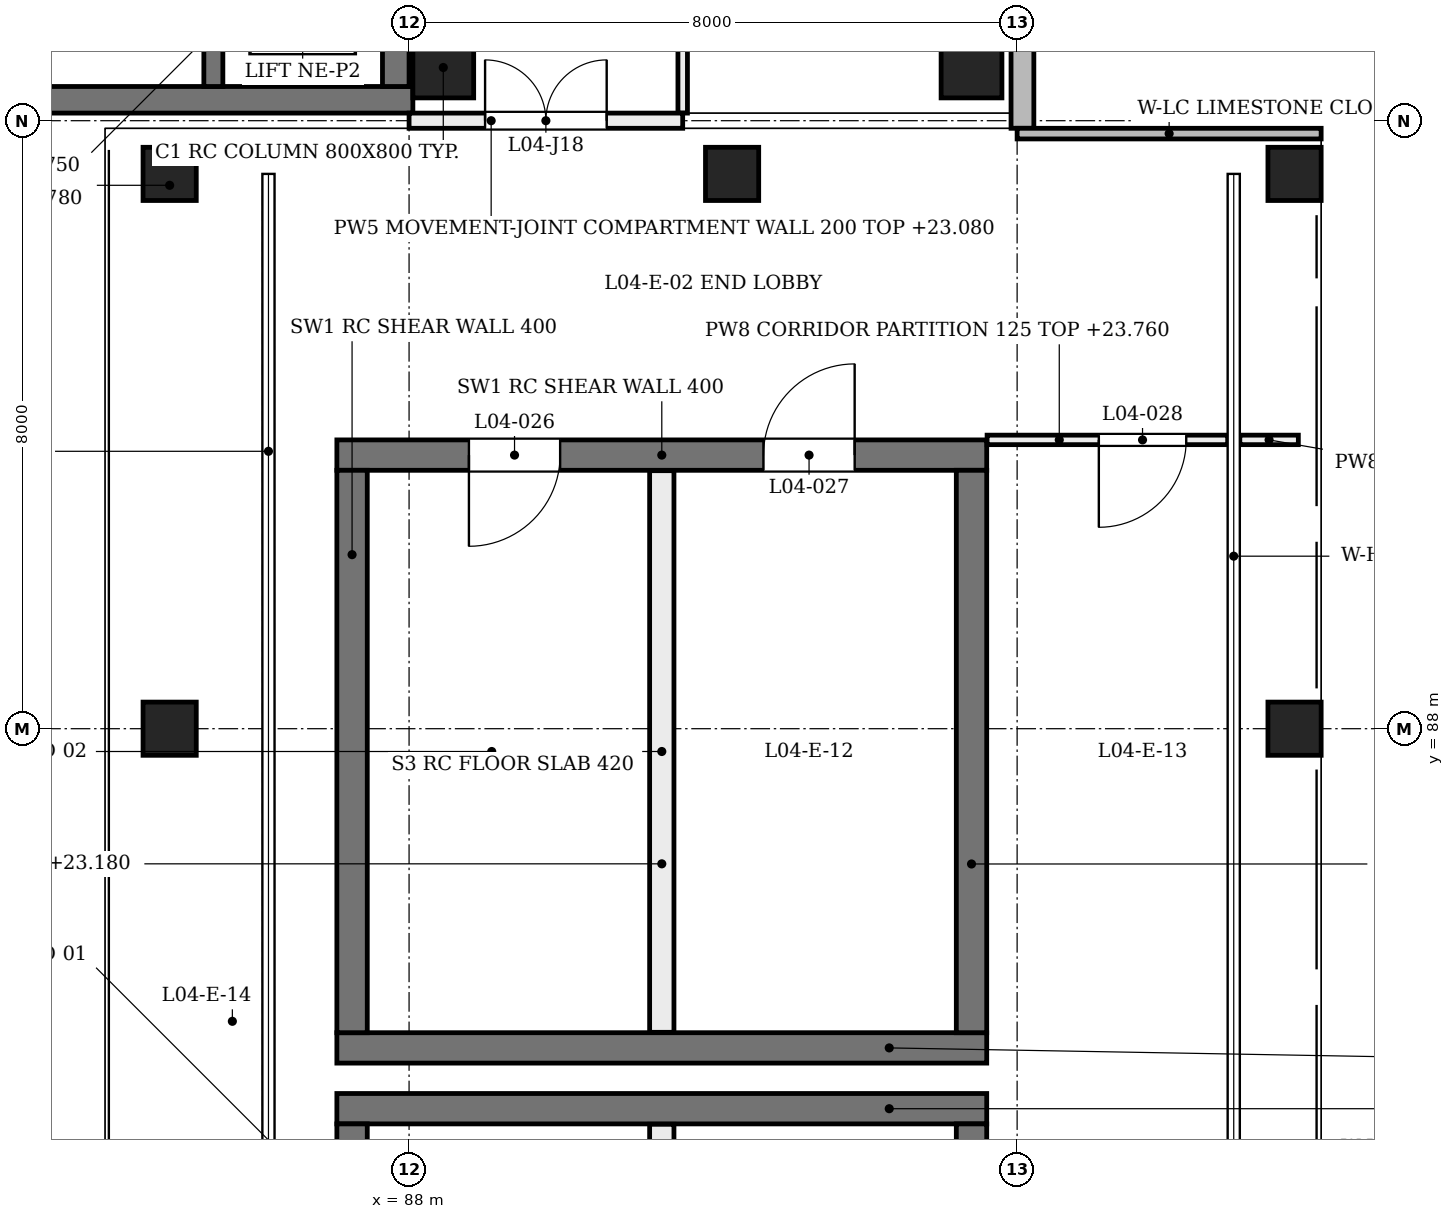
"""IFC4 building model, lengths in metres.
Left out: names, types, materials, properties, quantities, classifications, styles, units other than length and angle.
Written with IfcOpenShell. Run it as: python <this file> out.ifc"""

import sys

from ifc_helpers import new_model, si_unit, direction, frame, frame_2d, origin, origin_2d, place, context, subcontext, project, spatial, rectangle, extrude, element, fill, save


model = new_model("IFC4")
c1 = context("Model", 3, precision=1e-05, world=origin(), true_north=direction((0.0, 1.0)))
c2 = subcontext(c1, "Body", "Model", "MODEL_VIEW")
j1 = project(units=[si_unit("LENGTHUNIT", "METRE"), si_unit("PLANEANGLEUNIT", "RADIAN")], contexts=[c1])
p1 = place(None, origin())
s1 = spatial("IfcSite", under=j1, at=p1, CompositionType="ELEMENT")
p2 = place(p1, origin())
s2 = spatial("IfcBuilding", under=s1, at=p2, CompositionType="ELEMENT")
p3 = place(p2, frame((0.0, 0.0, 19.2)))
s3 = spatial("IfcBuildingStorey", under=s2, at=p3, CompositionType="ELEMENT", Elevation=19.2)
p4 = place(p3, frame((87.05, 83.0, 0.0), z_axis=(0.0, 0.0, 1.0), x_axis=(1.0, 0.0, 0.0)))
e1 = element("IfcWall", 1, at=p4, inside=s3, PredefinedType="SHEAR", context=c2, shape_type="SweptSolid", body=[
    extrude(rectangle(XDim=8.55, YDim=0.4, at=frame_2d((4.275, 0.0))), origin(), (0.0, 0.0, 1.0), 4.58),
])
p5 = place(p3, frame((87.25, 75.8, 0.0), z_axis=(0.0, 0.0, 1.0), x_axis=(0.0, 1.0, 0.0)))
e2 = element("IfcWall", 2, at=p5, inside=s3, PredefinedType="SHEAR", context=c2, shape_type="SweptSolid", body=[
    extrude(rectangle(XDim=7.0, YDim=0.4, at=frame_2d((3.5, 0.0))), origin(), (0.0, 0.0, 1.0), 4.58),
])
p6 = place(p5, frame((3.0, 0.0, 0.0)))
e3 = element("IfcOpeningElement", 3, at=p6, cuts=e2, PredefinedType="OPENING", context=c2, shape_type="SweptSolid", body=[
    extrude(rectangle(XDim=1.2, YDim=2.4, at=frame_2d((0.6, 1.2))), frame((0.0, 0.21, 0.0), z_axis=(0.0, -1.0, 0.0), x_axis=(1.0, 0.0, 0.0)), (0.0, 0.0, 1.0), 0.42),
])
p7 = place(p3, frame((95.4, 75.8, 0.0), z_axis=(0.0, 0.0, 1.0), x_axis=(0.0, 1.0, 0.0)))
e4 = element("IfcWall", 4, at=p7, inside=s3, PredefinedType="SHEAR", context=c2, shape_type="SweptSolid", body=[
    extrude(rectangle(XDim=7.0, YDim=0.4, at=frame_2d((3.5, 0.0))), origin(), (0.0, 0.0, 1.0), 4.58),
])
p8 = place(p7, frame((3.027, 0.0, 0.0)))
e5 = element("IfcOpeningElement", 5, at=p8, cuts=e4, PredefinedType="OPENING", context=c2, shape_type="SweptSolid", body=[
    extrude(rectangle(XDim=1.15, YDim=2.1, at=frame_2d((0.575, 1.05))), frame((0.0, 0.21, 0.0), z_axis=(0.0, -1.0, 0.0), x_axis=(1.0, 0.0, 0.0)), (0.0, 0.0, 1.0), 0.42),
])
p9 = place(p3, frame((87.05, 83.8, 0.0), z_axis=(0.0, 0.0, 1.0), x_axis=(1.0, 0.0, 0.0)))
e6 = element("IfcWall", 6, at=p9, inside=s3, PredefinedType="SHEAR", context=c2, shape_type="SweptSolid", body=[
    extrude(rectangle(XDim=8.55, YDim=0.4, at=frame_2d((4.275, 0.0))), origin(), (0.0, 0.0, 1.0), 4.58),
])
p10 = place(p3, frame((87.05, 91.6, 0.0), z_axis=(0.0, 0.0, 1.0), x_axis=(1.0, 0.0, 0.0)))
e7 = element("IfcWall", 7, at=p10, inside=s3, PredefinedType="SHEAR", context=c2, shape_type="SweptSolid", body=[
    extrude(rectangle(XDim=8.55, YDim=0.4, at=frame_2d((4.275, 0.0))), origin(), (0.0, 0.0, 1.0), 4.58),
])
p11 = place(p10, frame((1.738, 0.0, 0.0)))
e8 = element("IfcOpeningElement", 8, at=p11, cuts=e7, PredefinedType="OPENING", context=c2, shape_type="SweptSolid", body=[
    extrude(rectangle(XDim=1.2, YDim=2.4, at=frame_2d((0.6, 1.2))), frame((0.0, 0.21, 0.0), z_axis=(0.0, -1.0, 0.0), x_axis=(1.0, 0.0, 0.0)), (0.0, 0.0, 1.0), 0.42),
])
p12 = place(p10, frame((5.613, 0.0, 0.0)))
e9 = element("IfcOpeningElement", 9, at=p12, cuts=e7, PredefinedType="OPENING", context=c2, shape_type="SweptSolid", body=[
    extrude(rectangle(XDim=1.2, YDim=2.4, at=frame_2d((0.6, 1.2))), frame((0.0, 0.21, 0.0), z_axis=(0.0, -1.0, 0.0), x_axis=(1.0, 0.0, 0.0)), (0.0, 0.0, 1.0), 0.42),
])
for number, where, z_axis, x_axis in (
    (10, (87.25, 84.0, 0.0), (0.0, 0.0, 1.0), (0.0, 1.0, 0.0)),
    (11, (95.4, 84.0, 0.0), (0.0, 0.0, 1.0), (0.0, 1.0, 0.0)),
):
    element("IfcWall", number, at=place(p3, frame(where, z_axis=z_axis, x_axis=x_axis)), inside=s3, PredefinedType="SHEAR", context=c2, shape_type="SweptSolid", body=[
        extrude(rectangle(XDim=7.4, YDim=0.4, at=frame_2d((3.7, 0.0))), origin(), (0.0, 0.0, 1.0), 4.58),
    ])
p13 = place(p3, frame((80.1, 96.275, 0.0), z_axis=(0.0, 0.0, 1.0), x_axis=(1.0, 0.0, 0.0)))
e12 = element("IfcWall", 12, at=p13, inside=s3, PredefinedType="SHEAR", context=c2, shape_type="SweptSolid", body=[
    extrude(rectangle(XDim=7.95, YDim=0.35, at=frame_2d((3.975, 0.0))), origin(), (0.0, 0.0, 1.0), 4.58),
])
p14 = place(p3, frame((87.825, 96.45, 0.0), z_axis=(0.0, 0.0, 1.0), x_axis=(0.0, 1.0, 0.0)))
e13 = element("IfcWall", 13, at=p14, inside=s3, PredefinedType="SHEAR", context=c2, shape_type="SweptSolid", body=[
    extrude(rectangle(XDim=15.2, YDim=0.35, at=frame_2d((7.6, 0.0))), origin(), (0.0, 0.0, 1.0), 4.58),
])
p15 = place(p14, frame((13.25, 0.0, 0.0)))
e14 = element("IfcOpeningElement", 14, at=p15, cuts=e13, PredefinedType="OPENING", context=c2, shape_type="SweptSolid", body=[
    extrude(rectangle(XDim=1.0, YDim=2.1, at=frame_2d((0.5, 1.05))), frame((0.0, 0.185, 0.0), z_axis=(0.0, -1.0, 0.0), x_axis=(1.0, 0.0, 0.0)), (0.0, 0.0, 1.0), 0.37),
])
p16 = place(p14, frame((3.2, 0.0, 0.0)))
e15 = element("IfcOpeningElement", 15, at=p16, cuts=e13, PredefinedType="OPENING", context=c2, shape_type="SweptSolid", body=[
    extrude(rectangle(XDim=1.4, YDim=2.1, at=frame_2d((0.7, 1.05))), frame((0.0, 0.185, 0.0), z_axis=(0.0, -1.0, 0.0), x_axis=(1.0, 0.0, 0.0)), (0.0, 0.0, 1.0), 0.37),
])
for number, where, z_axis, x_axis in (
    (16, (88.45, 96.7, 0.0), (0.0, 0.0, 1.0), (1.0, 0.0, 0.0)),
    (17, (95.4, 96.7, 0.0), (0.0, 0.0, 1.0), (1.0, 0.0, 0.0)),
):
    element("IfcColumn", number, at=place(p3, frame(where, z_axis=z_axis, x_axis=x_axis)), inside=s3, PredefinedType="COLUMN", context=c2, shape_type="SweptSolid", body=[
        extrude(rectangle(XDim=0.8, YDim=0.8, at=origin_2d()), origin(), (0.0, 0.0, 1.0), 4.8),
    ])
for number, where, z_axis, x_axis in (
    (18, (84.6, 88.0, 0.0), (0.204, 0.0, 0.979), (0.0, 1.0, 0.0)),
    (19, (84.6, 95.3, 0.0), (0.204, 0.0, 0.979), (0.0, 1.0, 0.0)),
    (20, (92.0, 95.3, 0.0), (0.204, 0.0, 0.979), (0.0, 1.0, 0.0)),
    (21, (99.4, 88.0, 0.0), (0.204, 0.0, 0.979), (0.0, 1.0, 0.0)),
    (22, (99.4, 95.3, 0.0), (0.204, 0.0, 0.979), (0.0, 1.0, 0.0)),
):
    element("IfcColumn", number, at=place(p3, frame(where, z_axis=z_axis, x_axis=x_axis)), inside=s3, PredefinedType="COLUMN", context=c2, shape_type="SweptSolid", body=[
        extrude(rectangle(XDim=0.7, YDim=0.7, at=origin_2d()), origin(), (0.0, 0.0, 1.0), 4.678),
    ])
p17 = place(p3, frame((98.85, 80.2, 4.1), z_axis=(0.0, 0.0, 1.0), x_axis=(0.0, 1.0, 0.0)))
e23 = element("IfcWall", 23, at=p17, inside=s3, PredefinedType="SOLIDWALL", context=c2, shape_type="SweptSolid", body=[
    extrude(rectangle(XDim=7.6, YDim=0.15, at=frame_2d((3.8, 0.0))), origin(), (0.0, 0.0, 1.0), 0.48),
])
p18 = place(p3, frame((98.85, 88.2, 4.1), z_axis=(0.0, 0.0, 1.0), x_axis=(0.0, 1.0, 0.0)))
e24 = element("IfcWall", 24, at=p18, inside=s3, PredefinedType="SOLIDWALL", context=c2, shape_type="SweptSolid", body=[
    extrude(rectangle(XDim=6.9, YDim=0.15, at=frame_2d((3.45, 0.0))), origin(), (0.0, 0.0, 1.0), 0.48),
])
p19 = place(p3, frame((86.15, 80.2, 4.1), z_axis=(0.0, 0.0, 1.0), x_axis=(0.0, 1.0, 0.0)))
e25 = element("IfcWall", 25, at=p19, inside=s3, PredefinedType="SOLIDWALL", context=c2, shape_type="SweptSolid", body=[
    extrude(rectangle(XDim=7.6, YDim=0.15, at=frame_2d((3.8, 0.0))), origin(), (0.0, 0.0, 1.0), 0.48),
])
p20 = place(p3, frame((86.15, 88.2, 4.1), z_axis=(0.0, 0.0, 1.0), x_axis=(0.0, 1.0, 0.0)))
e26 = element("IfcWall", 26, at=p20, inside=s3, PredefinedType="SOLIDWALL", context=c2, shape_type="SweptSolid", body=[
    extrude(rectangle(XDim=6.9, YDim=0.15, at=frame_2d((3.45, 0.0))), origin(), (0.0, 0.0, 1.0), 0.48),
])
p21 = place(p3, frame((96.07, 95.9, 0.0), z_axis=(0.0, 0.0, 1.0), x_axis=(0.0, 1.0, 0.0)))
e27 = element("IfcWall", 27, at=p21, inside=s3, PredefinedType="SOLIDWALL", context=c2, shape_type="SweptSolid", body=[
    extrude(rectangle(XDim=16.4, YDim=0.3, at=frame_2d((8.2, 0.0))), origin(), (0.0, 0.0, 1.0), 3.9),
])
p22 = place(p21, frame((1.1, 0.0, 0.75)))
e28 = element("IfcOpeningElement", 28, at=p22, cuts=e27, PredefinedType="OPENING", context=c2, shape_type="SweptSolid", body=[
    extrude(rectangle(XDim=0.9, YDim=3.1, at=frame_2d((0.45, 1.55))), frame((0.0, 0.16, 0.0), z_axis=(0.0, -1.0, 0.0), x_axis=(1.0, 0.0, 0.0)), (0.0, 0.0, 1.0), 0.32),
])
p23 = place(p21, frame((3.8, 0.0, 0.75)))
e29 = element("IfcOpeningElement", 29, at=p23, cuts=e27, PredefinedType="OPENING", context=c2, shape_type="SweptSolid", body=[
    extrude(rectangle(XDim=0.9, YDim=3.1, at=frame_2d((0.45, 1.55))), frame((0.0, 0.16, 0.0), z_axis=(0.0, -1.0, 0.0), x_axis=(1.0, 0.0, 0.0)), (0.0, 0.0, 1.0), 0.32),
])
p24 = place(p21, frame((6.5, 0.0, 0.75)))
e30 = element("IfcOpeningElement", 30, at=p24, cuts=e27, PredefinedType="OPENING", context=c2, shape_type="SweptSolid", body=[
    extrude(rectangle(XDim=0.9, YDim=3.1, at=frame_2d((0.45, 1.55))), frame((0.0, 0.16, 0.0), z_axis=(0.0, -1.0, 0.0), x_axis=(1.0, 0.0, 0.0)), (0.0, 0.0, 1.0), 0.32),
])
p25 = place(p21, frame((9.2, 0.0, 0.75)))
e31 = element("IfcOpeningElement", 31, at=p25, cuts=e27, PredefinedType="OPENING", context=c2, shape_type="SweptSolid", body=[
    extrude(rectangle(XDim=0.9, YDim=3.1, at=frame_2d((0.45, 1.55))), frame((0.0, 0.16, 0.0), z_axis=(0.0, -1.0, 0.0), x_axis=(1.0, 0.0, 0.0)), (0.0, 0.0, 1.0), 0.32),
])
p26 = place(p21, frame((11.9, 0.0, 0.75)))
e32 = element("IfcOpeningElement", 32, at=p26, cuts=e27, PredefinedType="OPENING", context=c2, shape_type="SweptSolid", body=[
    extrude(rectangle(XDim=0.9, YDim=3.1, at=frame_2d((0.45, 1.55))), frame((0.0, 0.16, 0.0), z_axis=(0.0, -1.0, 0.0), x_axis=(1.0, 0.0, 0.0)), (0.0, 0.0, 1.0), 0.32),
])
p27 = place(p21, frame((14.6, 0.0, 0.75)))
e33 = element("IfcOpeningElement", 33, at=p27, cuts=e27, PredefinedType="OPENING", context=c2, shape_type="SweptSolid", body=[
    extrude(rectangle(XDim=0.9, YDim=3.1, at=frame_2d((0.45, 1.55))), frame((0.0, 0.16, 0.0), z_axis=(0.0, -1.0, 0.0), x_axis=(1.0, 0.0, 0.0)), (0.0, 0.0, 1.0), 0.32),
])
p28 = place(p3, frame((96.0, 95.83, 0.0), z_axis=(0.0, 0.0, 1.0), x_axis=(1.0, 0.0, 0.0)))
e34 = element("IfcWall", 34, at=p28, inside=s3, PredefinedType="SOLIDWALL", context=c2, shape_type="SweptSolid", body=[
    extrude(rectangle(XDim=4.0, YDim=0.14, at=frame_2d((2.0, 0.0))), origin(), (0.0, 0.0, 1.0), 3.9),
])
p29 = place(p3, frame((85.425, 98.9, 0.0), z_axis=(0.0, 0.0, 1.0), x_axis=(0.0, -1.0, 0.0)))
e35 = element("IfcWall", 35, at=p29, inside=s3, PredefinedType="SOLIDWALL", context=c2, shape_type="SweptSolid", body=[
    extrude(rectangle(XDim=2.45, YDim=0.25, at=frame_2d((1.225, 0.0))), origin(), (0.0, 0.0, 1.0), 4.55),
])
p30 = place(p3, frame((95.605, 91.8, 0.0), z_axis=(0.0, 0.0, 1.0), x_axis=(1.0, 0.0, 0.0)))
e36 = element("IfcWall", 36, at=p30, inside=s3, PredefinedType="PARTITIONING", context=c2, shape_type="SweptSolid", body=[
    extrude(rectangle(XDim=3.165, YDim=0.125, at=frame_2d((1.583, 0.0))), origin(), (0.0, 0.0, 1.0), 4.56),
])
p31 = place(p30, frame((1.47, 0.0, 0.0)))
e37 = element("IfcOpeningElement", 37, at=p31, cuts=e36, PredefinedType="OPENING", context=c2, shape_type="SweptSolid", body=[
    extrude(rectangle(XDim=1.15, YDim=2.1, at=frame_2d((0.575, 1.05))), frame((0.0, 0.073, 0.0), z_axis=(0.0, -1.0, 0.0), x_axis=(1.0, 0.0, 0.0)), (0.0, 0.0, 1.0), 0.145),
])
p32 = place(p3, frame((98.93, 91.8, 0.0), z_axis=(0.0, 0.0, 1.0), x_axis=(1.0, 0.0, 0.0)))
e38 = element("IfcWall", 38, at=p32, inside=s3, PredefinedType="PARTITIONING", context=c2, shape_type="SweptSolid", body=[
    extrude(rectangle(XDim=0.77, YDim=0.125, at=frame_2d((0.385, 0.0))), origin(), (0.0, 0.0, 1.0), 4.56),
])
p33 = place(p3, frame((91.325, 75.805, 0.0), z_axis=(0.0, 0.0, 1.0), x_axis=(0.0, 1.0, 0.0)))
e39 = element("IfcWall", 39, at=p33, inside=s3, PredefinedType="PARTITIONING", context=c2, shape_type="SweptSolid", body=[
    extrude(rectangle(XDim=6.99, YDim=0.32, at=frame_2d((3.495, 0.0))), origin(), (0.0, 0.0, 1.0), 3.98),
])
p34 = place(p33, frame((2.895, 0.0, 0.0)))
e40 = element("IfcOpeningElement", 40, at=p34, cuts=e39, PredefinedType="OPENING", context=c2, shape_type="SweptSolid", body=[
    extrude(rectangle(XDim=1.2, YDim=2.4, at=frame_2d((0.6, 1.2))), frame((0.0, 0.17, 0.0), z_axis=(0.0, -1.0, 0.0), x_axis=(1.0, 0.0, 0.0)), (0.0, 0.0, 1.0), 0.34),
])
p35 = place(p3, frame((91.325, 84.005, 0.0), z_axis=(0.0, 0.0, 1.0), x_axis=(0.0, 1.0, 0.0)))
e41 = element("IfcWall", 41, at=p35, inside=s3, PredefinedType="PARTITIONING", context=c2, shape_type="SweptSolid", body=[
    extrude(rectangle(XDim=7.39, YDim=0.32, at=frame_2d((3.695, 0.0))), origin(), (0.0, 0.0, 1.0), 3.98),
])
p36 = place(p3, frame((91.6, 96.1, 0.0), z_axis=(0.0, 0.0, 1.0), x_axis=(0.0, 1.0, 0.0)))
e42 = element("IfcWall", 42, at=p36, inside=s3, PredefinedType="PARTITIONING", context=c2, shape_type="SweptSolid", body=[
    extrude(rectangle(XDim=10.223, YDim=0.125, at=frame_2d((5.112, 0.0))), origin(), (0.0, 0.0, 1.0), 3.88),
])
p37 = place(p36, frame((2.286, 0.0, 0.0)))
e43 = element("IfcOpeningElement", 43, at=p37, cuts=e42, PredefinedType="OPENING", context=c2, shape_type="SweptSolid", body=[
    extrude(rectangle(XDim=1.0, YDim=2.1, at=frame_2d((0.5, 1.05))), frame((0.0, 0.073, 0.0), z_axis=(0.0, -1.0, 0.0), x_axis=(1.0, 0.0, 0.0)), (0.0, 0.0, 1.0), 0.145),
])
p38 = place(p3, frame((88.0, 96.0, 0.0), z_axis=(0.0, 0.0, 1.0), x_axis=(1.0, 0.0, 0.0)))
e44 = element("IfcWall", 44, at=p38, inside=s3, PredefinedType="PARTITIONING", context=c2, shape_type="SweptSolid", body=[
    extrude(rectangle(XDim=3.6, YDim=0.2, at=frame_2d((1.8, 0.0))), origin(), (0.0, 0.0, 1.0), 3.88),
])
p39 = place(p38, frame((1.0, 0.0, 0.0)))
e45 = element("IfcOpeningElement", 45, at=p39, cuts=e44, PredefinedType="OPENING", context=c2, shape_type="SweptSolid", body=[
    extrude(rectangle(XDim=1.6, YDim=2.1, at=frame_2d((0.8, 1.05))), frame((0.0, 0.11, 0.0), z_axis=(0.0, -1.0, 0.0), x_axis=(1.0, 0.0, 0.0)), (0.0, 0.0, 1.0), 0.22),
])
p40 = place(p11, frame((1.2, 0.0, 0.0), z_axis=(0.0, 0.0, 1.0), x_axis=(-1.0, 0.0, 0.0)))
e46 = element("IfcDoor", 46, at=p40, inside=s3, OperationType="SINGLE_SWING_LEFT", PredefinedType="DOOR", context=c2, shape_type="SweptSolid", body=[
    extrude(rectangle(XDim=1.2, YDim=2.4, at=frame_2d((0.6, 1.2))), frame((0.0, 0.025, 0.0), z_axis=(0.0, -1.0, 0.0), x_axis=(1.0, 0.0, 0.0)), (0.0, 0.0, 1.0), 0.05),
])
fill(e8, e46)
p41 = place(p12, frame((1.2, 0.0, 0.0), z_axis=(0.0, 0.0, 1.0), x_axis=(-1.0, 0.0, 0.0)))
e47 = element("IfcDoor", 47, at=p41, inside=s3, OperationType="SINGLE_SWING_RIGHT", PredefinedType="DOOR", context=c2, shape_type="SweptSolid", body=[
    extrude(rectangle(XDim=1.2, YDim=2.4, at=frame_2d((0.6, 1.2))), frame((0.0, 0.025, 0.0), z_axis=(0.0, -1.0, 0.0), x_axis=(1.0, 0.0, 0.0)), (0.0, 0.0, 1.0), 0.05),
])
fill(e9, e47)
p42 = place(p31, frame((1.15, 0.0, 0.0), z_axis=(0.0, 0.0, 1.0), x_axis=(-1.0, 0.0, 0.0)))
e48 = element("IfcDoor", 48, at=p42, inside=s3, OperationType="SINGLE_SWING_LEFT", PredefinedType="DOOR", context=c2, shape_type="SweptSolid", body=[
    extrude(rectangle(XDim=1.15, YDim=2.1, at=frame_2d((0.575, 1.05))), frame((0.0, 0.025, 0.0), z_axis=(0.0, -1.0, 0.0), x_axis=(1.0, 0.0, 0.0)), (0.0, 0.0, 1.0), 0.05),
])
fill(e37, e48)
p43 = place(p39, origin())
e49 = element("IfcDoor", 49, at=p43, inside=s3, OperationType="DOUBLE_DOOR_SINGLE_SWING", PredefinedType="DOOR", context=c2, shape_type="SweptSolid", body=[
    extrude(rectangle(XDim=1.6, YDim=2.1, at=frame_2d((0.8, 1.05))), frame((0.0, 0.025, 0.0), z_axis=(0.0, -1.0, 0.0), x_axis=(1.0, 0.0, 0.0)), (0.0, 0.0, 1.0), 0.05),
])
fill(e45, e49)
save(model, sys.argv[1])
